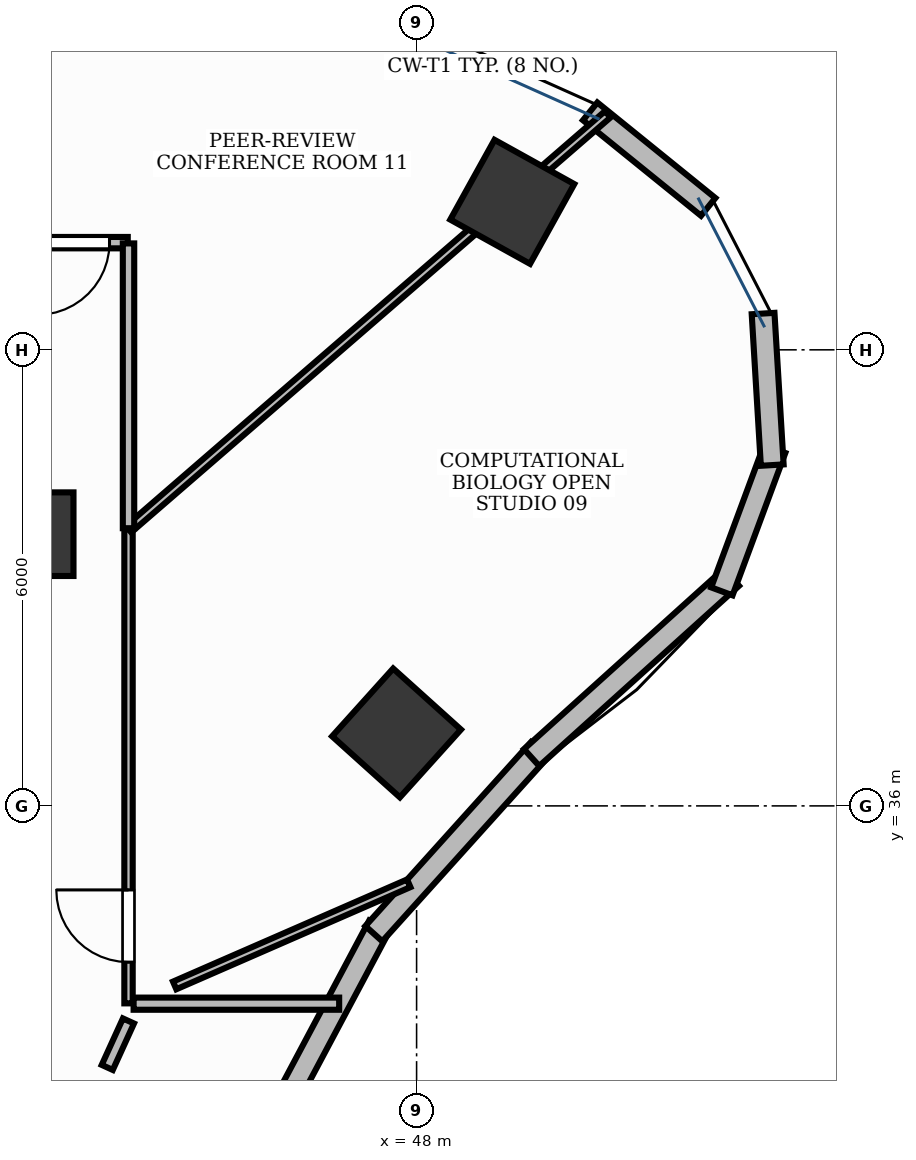
"""IFC4 building model, lengths in metres.
Left out: names, types, materials, properties, quantities, classifications, styles, units other than length and angle.
Written with IfcOpenShell. Run it as: python <this file> out.ifc"""

import sys

from ifc_helpers import new_model, si_unit, direction, frame, frame_2d, origin, origin_2d, place, context, subcontext, project, spatial, rectangle, extrude, element, fill, save


model = new_model("IFC4")
c1 = context("Model", 3, precision=1e-05, world=origin(), true_north=direction((0.0, 1.0)))
c2 = subcontext(c1, "Body", "Model", "MODEL_VIEW")
j1 = project(units=[si_unit("LENGTHUNIT", "METRE"), si_unit("PLANEANGLEUNIT", "RADIAN")], contexts=[c1])
p1 = place(None, origin())
s1 = spatial("IfcSite", under=j1, at=p1, CompositionType="ELEMENT")
p2 = place(p1, origin())
s2 = spatial("IfcBuilding", under=s1, at=p2, CompositionType="ELEMENT")
p3 = place(p2, frame((0.0, 0.0, 111.0)))
s3 = spatial("IfcBuildingStorey", under=s2, at=p3, CompositionType="ELEMENT", Elevation=111.0)
p4 = place(p3, frame((49.259, 43.947, -0.0), z_axis=(0.0, 0.0, 1.0), x_axis=(-0.874535078577, 0.484962262797, 0.0)))
e1 = element("IfcColumn", 1, at=p4, inside=s3, PredefinedType="COLUMN", context=c2, shape_type="SweptSolid", body=[
    extrude(rectangle(XDim=1.2, YDim=1.2, at=origin_2d()), origin(), (0.0, 0.0, 1.0), 3.901),
])
p5 = place(p3, frame((42.936, 39.575, -0.0), z_axis=(0.0, 0.0, 1.0), x_axis=(1.0, 0.0, 0.0)))
e2 = element("IfcColumn", 2, at=p5, inside=s3, PredefinedType="COLUMN", context=c2, shape_type="SweptSolid", body=[
    extrude(rectangle(XDim=1.1, YDim=1.1, at=origin_2d()), origin(), (0.0, 0.0, 1.0), 3.901),
])
p6 = place(p3, frame((47.736, 36.96, -0.0), z_axis=(0.0, 0.0, 1.0), x_axis=(0.669130606359, 0.743144825477, 0.0)))
e3 = element("IfcColumn", 3, at=p6, inside=s3, PredefinedType="COLUMN", context=c2, shape_type="SweptSolid", body=[
    extrude(rectangle(XDim=1.2, YDim=1.2, at=origin_2d()), origin(), (0.0, 0.0, 1.0), 3.901),
])
p7 = place(p3, frame((45.98, 31.547, 0.0), z_axis=(0.0, 0.0, 1.0), x_axis=(0.469451284634, 0.882958374645, 0.0)))
e4 = element("IfcWall", 4, at=p7, inside=s3, PredefinedType="STANDARD", context=c2, shape_type="SweptSolid", body=[
    extrude(rectangle(XDim=3.256, YDim=0.3, at=frame_2d((1.628, 0.0))), origin(), (0.0, 0.0, 1.0), 3.9),
])
p8 = place(p3, frame((47.437, 34.319, 0.0), z_axis=(0.0, 0.0, 1.0), x_axis=(0.669167727967, 0.743111399353, 0.0)))
e5 = element("IfcWall", 5, at=p8, inside=s3, PredefinedType="STANDARD", context=c2, shape_type="SweptSolid", body=[
    extrude(rectangle(XDim=3.255, YDim=0.3, at=frame_2d((1.628, 0.0))), origin(), (0.0, 0.0, 1.0), 3.9),
])
p9 = place(p3, frame((49.513, 36.636, 0.0), z_axis=(0.0, 0.0, 1.0), x_axis=(0.74255963233, 0.669779958221, 0.0)))
e6 = element("IfcWall", 6, at=p9, inside=s3, PredefinedType="STANDARD", context=c2, shape_type="SweptSolid", body=[
    extrude(rectangle(XDim=3.539, YDim=0.3, at=frame_2d((1.77, 0.0))), origin(), (0.0, 0.0, 1.0), 3.9),
])
p10 = place(p3, frame((52.016, 38.822, 0.0), z_axis=(0.0, 0.0, 1.0), x_axis=(0.347370087337, 0.937728117539, 0.0)))
e7 = element("IfcWall", 7, at=p10, inside=s3, PredefinedType="STANDARD", context=c2, shape_type="SweptSolid", body=[
    extrude(rectangle(XDim=1.997, YDim=0.3, at=frame_2d((0.999, 0.0))), origin(), (0.0, 0.0, 1.0), 3.9),
])
for number, where, z_axis, x_axis in (
    (8, (52.679, 40.483, 0.0), (0.0, 0.0, 1.0), (-0.06, 0.998, 0.0)),
    (9, (51.836, 43.881, 0.0), (0.0, 0.0, 1.0), (-0.777, 0.629, 0.0)),
):
    element("IfcWall", number, at=place(p3, frame(where, z_axis=z_axis, x_axis=x_axis)), inside=s3, PredefinedType="STANDARD", context=c2, shape_type="SweptSolid", body=[
        extrude(rectangle(XDim=1.998, YDim=0.3, at=frame_2d((0.999, 0.0))), origin(), (0.0, 0.0, 1.0), 3.9),
    ])
p11 = place(p3, frame((44.21, 33.402, 0.0), z_axis=(0.0, 0.0, 1.0), x_axis=(0.0, 1.0, 0.0)))
e10 = element("IfcWall", 10, at=p11, inside=s3, PredefinedType="MOVABLE", context=c2, shape_type="SweptSolid", body=[
    extrude(rectangle(XDim=6.238, YDim=0.11, at=frame_2d((3.119, 0.0))), origin(), (0.0, 0.0, 1.0), 2.91),
])
p12 = place(p11, frame((0.542, 0.0, 0.0)))
e11 = element("IfcOpeningElement", 11, at=p12, cuts=e10, PredefinedType="OPENING", context=c2, shape_type="SweptSolid", body=[
    extrude(rectangle(XDim=0.95, YDim=2.15, at=frame_2d((0.475, 1.075))), frame((0.0, 0.07, 0.0), z_axis=(0.0, -1.0, 0.0), x_axis=(1.0, 0.0, 0.0)), (0.0, 0.0, 1.0), 0.14),
])
p13 = place(p3, frame((44.2, 43.41, 0.0), z_axis=(0.0, 0.0, 1.0), x_axis=(-1.0, 0.0, 0.0)))
e12 = element("IfcWall", 12, at=p13, inside=s3, PredefinedType="PARTITIONING", context=c2, shape_type="SweptSolid", body=[
    extrude(rectangle(XDim=6.763, YDim=0.15, at=frame_2d((3.381, 0.0))), origin(), (0.0, 0.0, 1.0), 2.91),
])
p14 = place(p13, frame((0.24, 0.0, 0.0)))
e13 = element("IfcOpeningElement", 13, at=p14, cuts=e12, PredefinedType="OPENING", context=c2, shape_type="SweptSolid", body=[
    extrude(rectangle(XDim=0.95, YDim=2.15, at=frame_2d((0.475, 1.075))), frame((0.0, 0.09, 0.0), z_axis=(0.0, -1.0, 0.0), x_axis=(1.0, 0.0, 0.0)), (0.0, 0.0, 1.0), 0.18),
])
p15 = place(p3, frame((43.93, 32.559, 0.0), z_axis=(0.0, 0.0, 1.0), x_axis=(0.414377467152, 0.910105111905, 0.0)))
e14 = element("IfcWall", 14, at=p15, inside=s3, PredefinedType="PARTITIONING", context=c2, shape_type="SweptSolid", body=[
    extrude(rectangle(XDim=0.672, YDim=0.16, at=frame_2d((0.336, 0.0))), origin(), (0.0, 0.0, 1.0), 2.91),
])
p16 = place(p3, frame((44.277, 33.398, 0.0), z_axis=(0.0, 0.0, 1.0), x_axis=(1.0, 0.0, 0.0)))
e15 = element("IfcWall", 15, at=p16, inside=s3, PredefinedType="PARTITIONING", context=c2, shape_type="SweptSolid", body=[
    extrude(rectangle(XDim=2.704, YDim=0.16, at=frame_2d((1.352, 0.0))), origin(), (0.0, 0.0, 1.0), 2.91),
])
p17 = place(p3, frame((47.897, 34.982, 0.0), z_axis=(0.0, 0.0, 1.0), x_axis=(-0.916547126563, -0.399926699271, 0.0)))
e16 = element("IfcWall", 16, at=p17, inside=s3, PredefinedType="MOVABLE", context=c2, shape_type="SweptSolid", body=[
    extrude(rectangle(XDim=3.36, YDim=0.11, at=frame_2d((1.68, 0.0))), origin(), (0.0, 0.0, 1.0), 2.91),
])
p18 = place(p3, frame((44.21, 39.64, 0.0), z_axis=(0.0, 0.0, 1.0), x_axis=(0.756015454453, 0.654553766033, 0.0)))
e17 = element("IfcWall", 17, at=p18, inside=s3, PredefinedType="MOVABLE", context=c2, shape_type="SweptSolid", body=[
    extrude(rectangle(XDim=8.34, YDim=0.11, at=frame_2d((4.17, 0.0))), origin(), (0.0, 0.0, 1.0), 2.91),
])
p19 = place(p3, frame((44.21, 39.653, 0.0), z_axis=(0.0, 0.0, 1.0), x_axis=(0.0, 1.0, 0.0)))
e18 = element("IfcWall", 18, at=p19, inside=s3, PredefinedType="PARTITIONING", context=c2, shape_type="SweptSolid", body=[
    extrude(rectangle(XDim=3.747, YDim=0.15, at=frame_2d((1.874, 0.0))), origin(), (0.0, 0.0, 1.0), 2.91),
])
p20 = place(p12, origin())
e19 = element("IfcDoor", 19, at=p20, inside=s3, OperationType="SINGLE_SWING_RIGHT", PredefinedType="DOOR", context=c2, shape_type="SweptSolid", body=[
    extrude(rectangle(XDim=0.95, YDim=2.15, at=frame_2d((0.475, 1.075))), frame((0.0, 0.025, 0.0), z_axis=(0.0, -1.0, 0.0), x_axis=(1.0, 0.0, 0.0)), (0.0, 0.0, 1.0), 0.05),
])
fill(e11, e19)
p21 = place(p14, origin())
e20 = element("IfcDoor", 20, at=p21, inside=s3, OperationType="SINGLE_SWING_RIGHT", PredefinedType="DOOR", context=c2, shape_type="SweptSolid", body=[
    extrude(rectangle(XDim=0.95, YDim=2.15, at=frame_2d((0.475, 1.075))), frame((0.0, 0.025, 0.0), z_axis=(0.0, -1.0, 0.0), x_axis=(1.0, 0.0, 0.0)), (0.0, 0.0, 1.0), 0.05),
])
fill(e13, e20)
save(model, sys.argv[1])
